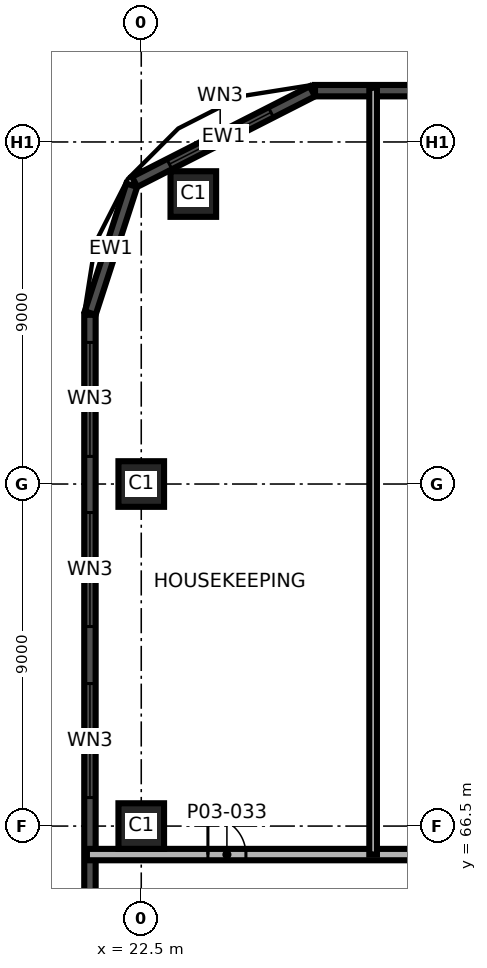
"""IFC4 building model, lengths in metres.
Left out: names, types, materials, properties, quantities, classifications, styles, units other than length and angle.
Written with IfcOpenShell. Run it as: python <this file> out.ifc"""

import sys

from ifc_helpers import new_model, si_unit, direction, frame, frame_2d, origin, origin_2d, place, context, subcontext, project, spatial, rectangle, extrude, element, fill, save


model = new_model("IFC4")
c1 = context("Model", 3, precision=1e-05, world=origin(), true_north=direction((0.0, 1.0)))
c2 = subcontext(c1, "Body", "Model", "MODEL_VIEW")
j1 = project(units=[si_unit("LENGTHUNIT", "METRE"), si_unit("PLANEANGLEUNIT", "RADIAN")], contexts=[c1])
p1 = place(None, origin())
s1 = spatial("IfcSite", under=j1, at=p1, CompositionType="ELEMENT")
p2 = place(p1, origin())
s2 = spatial("IfcBuilding", under=s1, at=p2, CompositionType="ELEMENT")
p3 = place(p2, frame((0.0, 0.0, 18.5)))
s3 = spatial("IfcBuildingStorey", under=s2, at=p3, CompositionType="ELEMENT", Elevation=18.5)
for number, where, z_axis, x_axis in (
    (1, (22.5, 66.5, 0.0), (0.0, 0.0, 1.0), (1.0, 0.0, 0.0)),
    (2, (22.5, 75.5, 0.0), (0.0, 0.0, 1.0), (1.0, 0.0, 0.0)),
    (3, (23.87, 83.13, 0.0), (0.0, 0.0, 1.0), (1.0, 0.0, 0.0)),
):
    element("IfcColumn", number, at=place(p3, frame(where, z_axis=z_axis, x_axis=x_axis)), inside=s3, PredefinedType="COLUMN", context=c2, shape_type="SweptSolid", body=[
        extrude(rectangle(XDim=1.2, YDim=1.2, at=origin_2d()), origin(), (0.0, 0.0, 1.0), 5.0),
    ])
p4 = place(p3, frame((53.952, 85.85, 0.0), z_axis=(0.0, 0.0, 1.0), x_axis=(-1.0, 0.0, 0.0)))
e4 = element("IfcWall", 4, at=p4, inside=s3, PredefinedType="SOLIDWALL", context=c2, shape_type="SweptSolid", body=[
    extrude(rectangle(XDim=26.88, YDim=0.3, at=frame_2d((13.44, 0.0))), origin(), (0.0, 0.0, 1.0), 4.7),
])
p5 = place(p4, frame((0.726, 0.0, 0.9)))
e5 = element("IfcOpeningElement", 5, at=p5, cuts=e4, PredefinedType="OPENING", context=c2, shape_type="SweptSolid", body=[
    extrude(rectangle(XDim=3.0, YDim=2.4, at=frame_2d((1.5, 1.2))), frame((0.0, 0.16, 0.0), z_axis=(0.0, -1.0, 0.0), x_axis=(1.0, 0.0, 0.0)), (0.0, 0.0, 1.0), 0.32),
])
p6 = place(p4, frame((5.202, 0.0, 0.9)))
e6 = element("IfcOpeningElement", 6, at=p6, cuts=e4, PredefinedType="OPENING", context=c2, shape_type="SweptSolid", body=[
    extrude(rectangle(XDim=3.0, YDim=2.4, at=frame_2d((1.5, 1.2))), frame((0.0, 0.16, 0.0), z_axis=(0.0, -1.0, 0.0), x_axis=(1.0, 0.0, 0.0)), (0.0, 0.0, 1.0), 0.32),
])
p7 = place(p4, frame((9.702, 0.0, 0.9)))
e7 = element("IfcOpeningElement", 7, at=p7, cuts=e4, PredefinedType="OPENING", context=c2, shape_type="SweptSolid", body=[
    extrude(rectangle(XDim=3.0, YDim=2.4, at=frame_2d((1.5, 1.2))), frame((0.0, 0.16, 0.0), z_axis=(0.0, -1.0, 0.0), x_axis=(1.0, 0.0, 0.0)), (0.0, 0.0, 1.0), 0.32),
])
p8 = place(p4, frame((14.202, 0.0, 0.9)))
e8 = element("IfcOpeningElement", 8, at=p8, cuts=e4, PredefinedType="OPENING", context=c2, shape_type="SweptSolid", body=[
    extrude(rectangle(XDim=3.0, YDim=2.4, at=frame_2d((1.5, 1.2))), frame((0.0, 0.16, 0.0), z_axis=(0.0, -1.0, 0.0), x_axis=(1.0, 0.0, 0.0)), (0.0, 0.0, 1.0), 0.32),
])
p9 = place(p3, frame((27.004, 85.834, 0.0), z_axis=(0.0, 0.0, 1.0), x_axis=(-0.890998339455, -0.454006562826, 0.0)))
e9 = element("IfcWall", 9, at=p9, inside=s3, PredefinedType="SOLIDWALL", context=c2, shape_type="SweptSolid", body=[
    extrude(rectangle(XDim=5.252, YDim=0.3, at=frame_2d((2.626, 0.0))), origin(), (0.0, 0.0, 1.0), 4.7),
])
p10 = place(p9, frame((1.224, 0.0, 0.9)))
e10 = element("IfcOpeningElement", 10, at=p10, cuts=e9, PredefinedType="OPENING", context=c2, shape_type="SweptSolid", body=[
    extrude(rectangle(XDim=3.0, YDim=2.4, at=frame_2d((1.5, 1.2))), frame((0.0, 0.16, 0.0), z_axis=(0.0, -1.0, 0.0), x_axis=(1.0, 0.0, 0.0)), (0.0, 0.0, 1.0), 0.32),
])
p11 = place(p3, frame((22.25, 83.362, 0.0), z_axis=(0.0, 0.0, 1.0), x_axis=(-0.309073584194, -0.951038127287, 0.0)))
e11 = element("IfcWall", 11, at=p11, inside=s3, PredefinedType="SOLIDWALL", context=c2, shape_type="SweptSolid", body=[
    extrude(rectangle(XDim=3.536, YDim=0.3, at=frame_2d((1.768, 0.0))), origin(), (0.0, 0.0, 1.0), 4.7),
])
p12 = place(p3, frame((21.15, 79.952, 0.0), z_axis=(0.0, 0.0, 1.0), x_axis=(0.0, -1.0, 0.0)))
e12 = element("IfcWall", 12, at=p12, inside=s3, PredefinedType="SOLIDWALL", context=c2, shape_type="SweptSolid", body=[
    extrude(rectangle(XDim=62.88, YDim=0.3, at=frame_2d((31.44, 0.0))), origin(), (0.0, 0.0, 1.0), 4.7),
])
p13 = place(p12, frame((0.726, 0.0, 0.9)))
e13 = element("IfcOpeningElement", 13, at=p13, cuts=e12, PredefinedType="OPENING", context=c2, shape_type="SweptSolid", body=[
    extrude(rectangle(XDim=3.0, YDim=2.4, at=frame_2d((1.5, 1.2))), frame((0.0, 0.16, 0.0), z_axis=(0.0, -1.0, 0.0), x_axis=(1.0, 0.0, 0.0)), (0.0, 0.0, 1.0), 0.32),
])
p14 = place(p12, frame((5.202, 0.0, 0.9)))
e14 = element("IfcOpeningElement", 14, at=p14, cuts=e12, PredefinedType="OPENING", context=c2, shape_type="SweptSolid", body=[
    extrude(rectangle(XDim=3.0, YDim=2.4, at=frame_2d((1.5, 1.2))), frame((0.0, 0.16, 0.0), z_axis=(0.0, -1.0, 0.0), x_axis=(1.0, 0.0, 0.0)), (0.0, 0.0, 1.0), 0.32),
])
p15 = place(p12, frame((9.702, 0.0, 0.9)))
e15 = element("IfcOpeningElement", 15, at=p15, cuts=e12, PredefinedType="OPENING", context=c2, shape_type="SweptSolid", body=[
    extrude(rectangle(XDim=3.0, YDim=2.4, at=frame_2d((1.5, 1.2))), frame((0.0, 0.16, 0.0), z_axis=(0.0, -1.0, 0.0), x_axis=(1.0, 0.0, 0.0)), (0.0, 0.0, 1.0), 0.32),
])
p16 = place(p12, frame((18.702, 0.0, 0.9)))
e16 = element("IfcOpeningElement", 16, at=p16, cuts=e12, PredefinedType="OPENING", context=c2, shape_type="SweptSolid", body=[
    extrude(rectangle(XDim=3.0, YDim=2.4, at=frame_2d((1.5, 1.2))), frame((0.0, 0.16, 0.0), z_axis=(0.0, -1.0, 0.0), x_axis=(1.0, 0.0, 0.0)), (0.0, 0.0, 1.0), 0.32),
])
p17 = place(p12, frame((32.202, 0.0, 0.9)))
e17 = element("IfcOpeningElement", 17, at=p17, cuts=e12, PredefinedType="OPENING", context=c2, shape_type="SweptSolid", body=[
    extrude(rectangle(XDim=3.0, YDim=2.4, at=frame_2d((1.5, 1.2))), frame((0.0, 0.16, 0.0), z_axis=(0.0, -1.0, 0.0), x_axis=(1.0, 0.0, 0.0)), (0.0, 0.0, 1.0), 0.32),
])
p18 = place(p12, frame((41.202, 0.0, 0.9)))
e18 = element("IfcOpeningElement", 18, at=p18, cuts=e12, PredefinedType="OPENING", context=c2, shape_type="SweptSolid", body=[
    extrude(rectangle(XDim=3.0, YDim=2.4, at=frame_2d((1.5, 1.2))), frame((0.0, 0.16, 0.0), z_axis=(0.0, -1.0, 0.0), x_axis=(1.0, 0.0, 0.0)), (0.0, 0.0, 1.0), 0.32),
])
p19 = place(p12, frame((45.702, 0.0, 0.9)))
e19 = element("IfcOpeningElement", 19, at=p19, cuts=e12, PredefinedType="OPENING", context=c2, shape_type="SweptSolid", body=[
    extrude(rectangle(XDim=3.0, YDim=2.4, at=frame_2d((1.5, 1.2))), frame((0.0, 0.16, 0.0), z_axis=(0.0, -1.0, 0.0), x_axis=(1.0, 0.0, 0.0)), (0.0, 0.0, 1.0), 0.32),
])
p20 = place(p12, frame((50.202, 0.0, 0.9)))
e20 = element("IfcOpeningElement", 20, at=p20, cuts=e12, PredefinedType="OPENING", context=c2, shape_type="SweptSolid", body=[
    extrude(rectangle(XDim=3.0, YDim=2.4, at=frame_2d((1.5, 1.2))), frame((0.0, 0.16, 0.0), z_axis=(0.0, -1.0, 0.0), x_axis=(1.0, 0.0, 0.0)), (0.0, 0.0, 1.0), 0.32),
])
p21 = place(p12, frame((54.702, 0.0, 0.9)))
e21 = element("IfcOpeningElement", 21, at=p21, cuts=e12, PredefinedType="OPENING", context=c2, shape_type="SweptSolid", body=[
    extrude(rectangle(XDim=3.0, YDim=2.4, at=frame_2d((1.5, 1.2))), frame((0.0, 0.16, 0.0), z_axis=(0.0, -1.0, 0.0), x_axis=(1.0, 0.0, 0.0)), (0.0, 0.0, 1.0), 0.32),
])
p22 = place(p12, frame((59.226, 0.0, 0.9)))
e22 = element("IfcOpeningElement", 22, at=p22, cuts=e12, PredefinedType="OPENING", context=c2, shape_type="SweptSolid", body=[
    extrude(rectangle(XDim=3.0, YDim=2.4, at=frame_2d((1.5, 1.2))), frame((0.0, 0.16, 0.0), z_axis=(0.0, -1.0, 0.0), x_axis=(1.0, 0.0, 0.0)), (0.0, 0.0, 1.0), 0.32),
])
p23 = place(p3, frame((21.07, 65.75, 0.0), z_axis=(0.0, 0.0, 1.0), x_axis=(1.0, 0.0, 0.0)))
e23 = element("IfcWall", 23, at=p23, inside=s3, PredefinedType="SHEAR", context=c2, shape_type="SweptSolid", body=[
    extrude(rectangle(XDim=38.86, YDim=0.3, at=frame_2d((19.43, 0.0))), origin(), (0.0, 0.0, 1.0), 4.7),
])
p24 = place(p23, frame((20.68, 0.0, 0.0)))
e24 = element("IfcOpeningElement", 24, at=p24, cuts=e23, PredefinedType="OPENING", context=c2, shape_type="SweptSolid", body=[
    extrude(rectangle(XDim=1.2, YDim=2.1, at=frame_2d((0.6, 1.05))), frame((0.0, 0.16, 0.0), z_axis=(0.0, -1.0, 0.0), x_axis=(1.0, 0.0, 0.0)), (0.0, 0.0, 1.0), 0.32),
])
p25 = place(p23, frame((15.25, 0.0, 0.0)))
e25 = element("IfcOpeningElement", 25, at=p25, cuts=e23, PredefinedType="OPENING", context=c2, shape_type="SweptSolid", body=[
    extrude(rectangle(XDim=1.0, YDim=2.1, at=frame_2d((0.5, 1.05))), frame((0.0, 0.16, 0.0), z_axis=(0.0, -1.0, 0.0), x_axis=(1.0, 0.0, 0.0)), (0.0, 0.0, 1.0), 0.32),
])
p26 = place(p23, frame((30.675, 0.0, 0.0)))
e26 = element("IfcOpeningElement", 26, at=p26, cuts=e23, PredefinedType="OPENING", context=c2, shape_type="SweptSolid", body=[
    extrude(rectangle(XDim=1.0, YDim=2.1, at=frame_2d((0.5, 1.05))), frame((0.0, 0.16, 0.0), z_axis=(0.0, -1.0, 0.0), x_axis=(1.0, 0.0, 0.0)), (0.0, 0.0, 1.0), 0.32),
])
p27 = place(p23, frame((3.184, 0.0, 0.0)))
e27 = element("IfcOpeningElement", 27, at=p27, cuts=e23, PredefinedType="OPENING", context=c2, shape_type="SweptSolid", body=[
    extrude(rectangle(XDim=1.0, YDim=2.1, at=frame_2d((0.5, 1.05))), frame((0.0, 0.16, 0.0), z_axis=(0.0, -1.0, 0.0), x_axis=(1.0, 0.0, 0.0)), (0.0, 0.0, 1.0), 0.32),
])
p28 = place(p23, frame((11.43, 0.0, 0.0)))
e28 = element("IfcOpeningElement", 28, at=p28, cuts=e23, PredefinedType="OPENING", context=c2, shape_type="SweptSolid", body=[
    extrude(rectangle(XDim=1.0, YDim=2.1, at=frame_2d((0.5, 1.05))), frame((0.0, 0.16, 0.0), z_axis=(0.0, -1.0, 0.0), x_axis=(1.0, 0.0, 0.0)), (0.0, 0.0, 1.0), 0.32),
])
p29 = place(p3, frame((28.601, 65.75, 0.0), z_axis=(0.0, 0.0, 1.0), x_axis=(0.0, 1.0, 0.0)))
e29 = element("IfcWall", 29, at=p29, inside=s3, PredefinedType="PARTITIONING", context=c2, shape_type="SweptSolid", body=[
    extrude(rectangle(XDim=20.18, YDim=0.2, at=frame_2d((10.09, 0.0))), origin(), (0.0, 0.0, 1.0), 4.7),
])
p30 = place(p10, origin())
e30 = element("IfcWindow", 30, at=p30, inside=s3, PartitioningType="SINGLE_PANEL", PredefinedType="WINDOW", context=c2, shape_type="SweptSolid", body=[
    extrude(rectangle(XDim=3.0, YDim=2.4, at=frame_2d((1.5, 1.2))), frame((0.0, 0.03, 0.0), z_axis=(0.0, -1.0, 0.0), x_axis=(1.0, 0.0, 0.0)), (0.0, 0.0, 1.0), 0.06),
])
fill(e10, e30)
p31 = place(p13, origin())
e31 = element("IfcWindow", 31, at=p31, inside=s3, PartitioningType="SINGLE_PANEL", PredefinedType="WINDOW", context=c2, shape_type="SweptSolid", body=[
    extrude(rectangle(XDim=3.0, YDim=2.4, at=frame_2d((1.5, 1.2))), frame((0.0, 0.03, 0.0), z_axis=(0.0, -1.0, 0.0), x_axis=(1.0, 0.0, 0.0)), (0.0, 0.0, 1.0), 0.06),
])
fill(e13, e31)
p32 = place(p14, origin())
e32 = element("IfcWindow", 32, at=p32, inside=s3, PartitioningType="SINGLE_PANEL", PredefinedType="WINDOW", context=c2, shape_type="SweptSolid", body=[
    extrude(rectangle(XDim=3.0, YDim=2.4, at=frame_2d((1.5, 1.2))), frame((0.0, 0.03, 0.0), z_axis=(0.0, -1.0, 0.0), x_axis=(1.0, 0.0, 0.0)), (0.0, 0.0, 1.0), 0.06),
])
fill(e14, e32)
p33 = place(p15, origin())
e33 = element("IfcWindow", 33, at=p33, inside=s3, PartitioningType="SINGLE_PANEL", PredefinedType="WINDOW", context=c2, shape_type="SweptSolid", body=[
    extrude(rectangle(XDim=3.0, YDim=2.4, at=frame_2d((1.5, 1.2))), frame((0.0, 0.03, 0.0), z_axis=(0.0, -1.0, 0.0), x_axis=(1.0, 0.0, 0.0)), (0.0, 0.0, 1.0), 0.06),
])
fill(e15, e33)
p34 = place(p27, origin())
e34 = element("IfcDoor", 34, at=p34, inside=s3, OperationType="SINGLE_SWING_LEFT", PredefinedType="DOOR", context=c2, shape_type="SweptSolid", body=[
    extrude(rectangle(XDim=1.0, YDim=2.1, at=frame_2d((0.5, 1.05))), frame((0.0, 0.025, 0.0), z_axis=(0.0, -1.0, 0.0), x_axis=(1.0, 0.0, 0.0)), (0.0, 0.0, 1.0), 0.05),
])
fill(e27, e34)
save(model, sys.argv[1])
